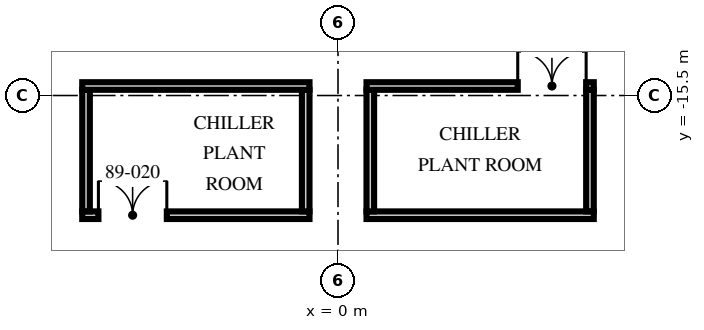
"""IFC4 building model, lengths in metres.
Left out: names, types, materials, properties, quantities, classifications, styles, units other than length and angle.
Written with IfcOpenShell. Run it as: python <this file> out.ifc"""

import sys

from ifc_helpers import new_model, si_unit, direction, frame, frame_2d, origin, place, context, subcontext, project, spatial, rectangle, extrude, element, fill, save


model = new_model("IFC4")
c1 = context("Model", 3, precision=1e-05, world=origin(), true_north=direction((0.0, 1.0)))
c2 = subcontext(c1, "Body", "Model", "MODEL_VIEW")
j1 = project(units=[si_unit("LENGTHUNIT", "METRE"), si_unit("PLANEANGLEUNIT", "RADIAN")], contexts=[c1])
p1 = place(None, origin())
s1 = spatial("IfcSite", under=j1, at=p1, CompositionType="ELEMENT")
p2 = place(p1, origin())
s2 = spatial("IfcBuilding", under=s1, at=p2, CompositionType="ELEMENT")
p3 = place(p2, frame((0.0, 0.0, 353.25)))
s3 = spatial("IfcBuildingStorey", under=s2, at=p3, CompositionType="ELEMENT", Elevation=353.25)
p4 = place(p3, frame((-6.73, -18.65, 0.0), z_axis=(0.0, 0.0, 1.0), x_axis=(1.0, 0.0, 0.0)))
e1 = element("IfcWall", 1, at=p4, inside=s3, PredefinedType="SOLIDWALL", context=c2, shape_type="SweptSolid", body=[
    extrude(rectangle(XDim=5.98, YDim=0.2, at=frame_2d((2.99, 0.0))), origin(), (0.0, 0.0, 1.0), 3.91),
])
p5 = place(p4, frame((0.426, 0.0, 0.0)))
e2 = element("IfcOpeningElement", 2, at=p5, cuts=e1, PredefinedType="OPENING", context=c2, shape_type="SweptSolid", body=[
    extrude(rectangle(XDim=1.8, YDim=2.4, at=frame_2d((0.9, 1.2))), frame((0.0, 0.11, 0.0), z_axis=(0.0, -1.0, 0.0), x_axis=(1.0, 0.0, 0.0)), (0.0, 0.0, 1.0), 0.22),
])
p6 = place(p3, frame((0.75, -18.65, 0.0), z_axis=(0.0, 0.0, 1.0), x_axis=(1.0, 0.0, 0.0)))
e3 = element("IfcWall", 3, at=p6, inside=s3, PredefinedType="SOLIDWALL", context=c2, shape_type="SweptSolid", body=[
    extrude(rectangle(XDim=5.98, YDim=0.2, at=frame_2d((2.99, 0.0))), origin(), (0.0, 0.0, 1.0), 3.91),
])
for number, where, z_axis, x_axis in (
    (4, (-6.63, -18.55, 0.0), (0.0, 0.0, 1.0), (0.0, 1.0, 0.0)),
    (5, (-0.85, -18.55, 0.0), (0.0, 0.0, 1.0), (0.0, 1.0, 0.0)),
    (6, (0.85, -18.55, 0.0), (0.0, 0.0, 1.0), (0.0, 1.0, 0.0)),
    (7, (6.63, -18.55, 0.0), (0.0, 0.0, 1.0), (0.0, 1.0, 0.0)),
):
    element("IfcWall", number, at=place(p3, frame(where, z_axis=z_axis, x_axis=x_axis)), inside=s3, PredefinedType="SOLIDWALL", context=c2, shape_type="SweptSolid", body=[
        extrude(rectangle(XDim=3.2, YDim=0.2, at=frame_2d((1.6, 0.0))), origin(), (0.0, 0.0, 1.0), 4.7),
    ])
p7 = place(p3, frame((-6.73, -15.25, 0.0), z_axis=(0.0, 0.0, 1.0), x_axis=(1.0, 0.0, 0.0)))
e8 = element("IfcWall", 8, at=p7, inside=s3, PredefinedType="SOLIDWALL", context=c2, shape_type="SweptSolid", body=[
    extrude(rectangle(XDim=5.98, YDim=0.2, at=frame_2d((2.99, 0.0))), origin(), (0.0, 0.0, 1.0), 3.91),
])
p8 = place(p3, frame((0.75, -15.25, 0.0), z_axis=(0.0, 0.0, 1.0), x_axis=(1.0, 0.0, 0.0)))
e9 = element("IfcWall", 9, at=p8, inside=s3, PredefinedType="SOLIDWALL", context=c2, shape_type="SweptSolid", body=[
    extrude(rectangle(XDim=5.98, YDim=0.2, at=frame_2d((2.99, 0.0))), origin(), (0.0, 0.0, 1.0), 3.91),
])
p9 = place(p8, frame((3.979, 0.0, 0.0)))
e10 = element("IfcOpeningElement", 10, at=p9, cuts=e9, PredefinedType="OPENING", context=c2, shape_type="SweptSolid", body=[
    extrude(rectangle(XDim=1.8, YDim=2.4, at=frame_2d((0.9, 1.2))), frame((0.0, 0.11, 0.0), z_axis=(0.0, -1.0, 0.0), x_axis=(1.0, 0.0, 0.0)), (0.0, 0.0, 1.0), 0.22),
])
p10 = place(p5, origin())
e11 = element("IfcDoor", 11, at=p10, inside=s3, OperationType="DOUBLE_DOOR_SINGLE_SWING", PredefinedType="DOOR", context=c2, shape_type="SweptSolid", body=[
    extrude(rectangle(XDim=1.8, YDim=2.4, at=frame_2d((0.9, 1.2))), frame((0.0, 0.025, 0.0), z_axis=(0.0, -1.0, 0.0), x_axis=(1.0, 0.0, 0.0)), (0.0, 0.0, 1.0), 0.05),
])
fill(e2, e11)
p11 = place(p9, origin())
e12 = element("IfcDoor", 12, at=p11, inside=s3, OperationType="DOUBLE_DOOR_SINGLE_SWING", PredefinedType="DOOR", context=c2, shape_type="SweptSolid", body=[
    extrude(rectangle(XDim=1.8, YDim=2.4, at=frame_2d((0.9, 1.2))), frame((0.0, 0.025, 0.0), z_axis=(0.0, -1.0, 0.0), x_axis=(1.0, 0.0, 0.0)), (0.0, 0.0, 1.0), 0.05),
])
fill(e10, e12)
save(model, sys.argv[1])
